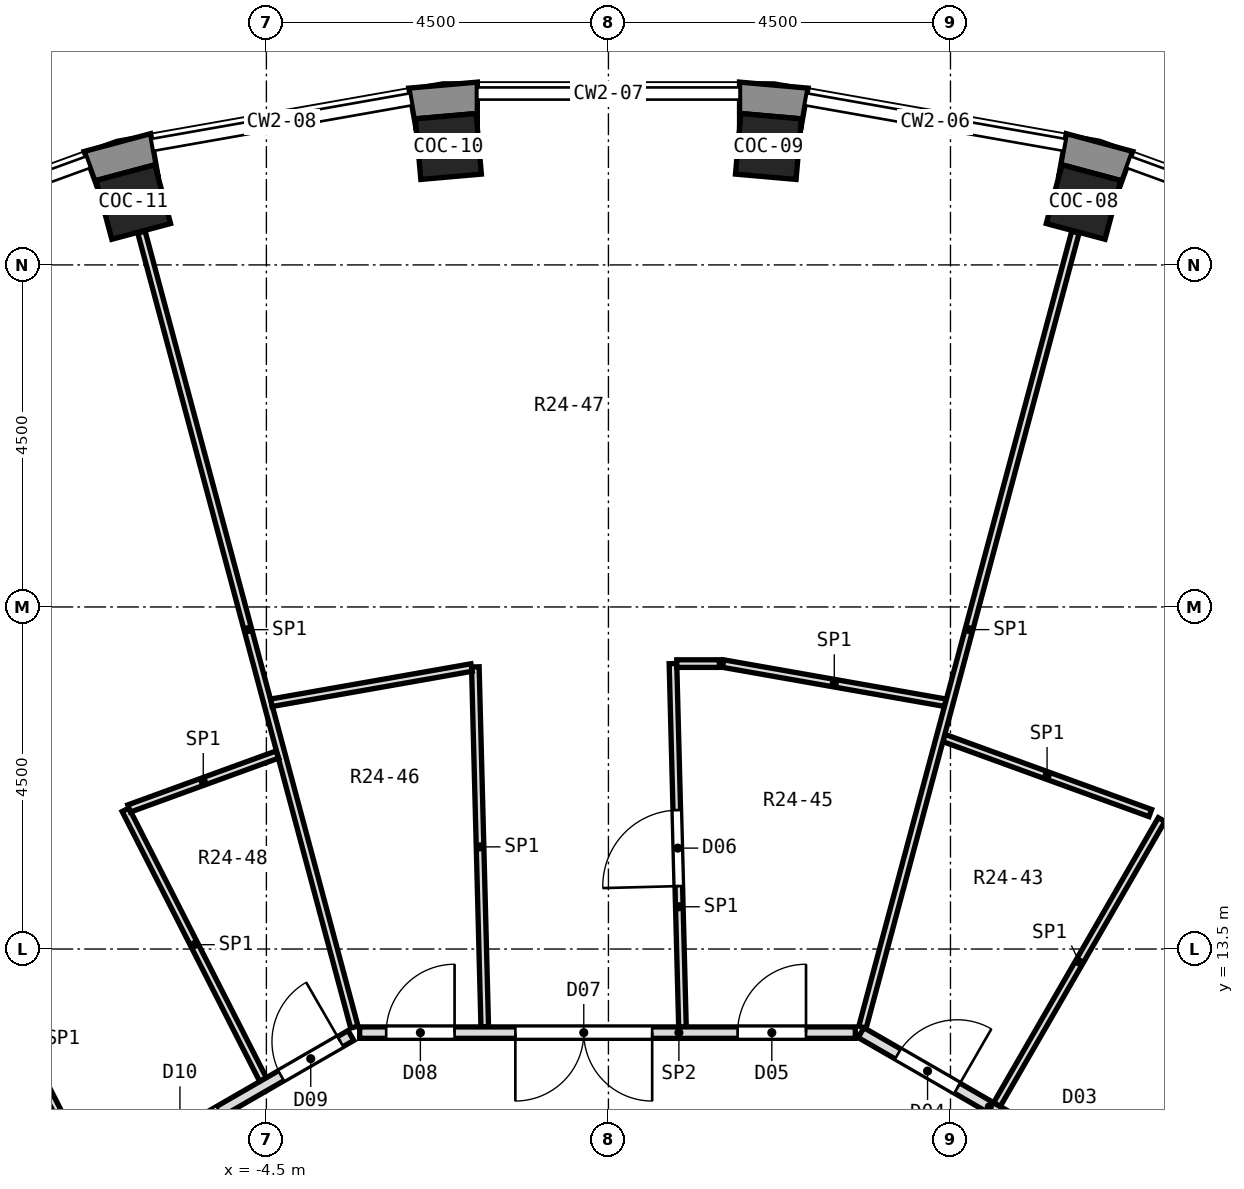
"""IFC4 building model, lengths in metres.
Left out: names, types, materials, properties, quantities, classifications, styles, units other than length and angle.
Written with IfcOpenShell. Run it as: python <this file> out.ifc"""

import sys

from ifc_helpers import new_model, si_unit, direction, frame, frame_2d, origin, origin_2d, place, context, subcontext, project, spatial, polyline, rectangle, outline, extrude, element, fill, save


model = new_model("IFC4")
c1 = context("Model", 3, precision=1e-05, world=origin(), true_north=direction((0.0, 1.0)))
c2 = subcontext(c1, "Body", "Model", "MODEL_VIEW")
j1 = project(units=[si_unit("LENGTHUNIT", "METRE"), si_unit("PLANEANGLEUNIT", "RADIAN")], contexts=[c1])
p1 = place(None, origin())
s1 = spatial("IfcSite", under=j1, at=p1, CompositionType="ELEMENT")
p2 = place(p1, origin())
s2 = spatial("IfcBuilding", under=s1, at=p2, CompositionType="ELEMENT")
p3 = place(p2, frame((0.0, 0.0, 155.8)))
s3 = spatial("IfcBuildingStorey", under=s2, at=p3, CompositionType="ELEMENT", Elevation=155.8)
for number, where, z_axis, x_axis in (
    (1, (6.25, 23.327, -0.55), (0.0, 0.0, 1.0), (0.259, 0.966, 0.0)),
    (2, (2.105, 24.058, -0.55), (0.0, 0.0, 1.0), (0.087, 0.996, 0.0)),
    (3, (-2.105, 24.058, -0.55), (0.0, 0.0, 1.0), (-0.087, 0.996, 0.0)),
    (4, (-6.25, 23.327, -0.55), (0.0, 0.0, 1.0), (-0.259, 0.966, 0.0)),
):
    element("IfcColumn", number, at=place(p3, frame(where, z_axis=z_axis, x_axis=x_axis)), inside=s3, PredefinedType="COLUMN", context=c2, shape_type="SweptSolid", body=[
        extrude(rectangle(XDim=0.8, YDim=0.8, at=origin_2d()), origin(), (0.0, 0.0, 1.0), 5.55),
    ])
p4 = place(p3, origin())
e5 = element("IfcWall", 5, at=p4, inside=s3, PredefinedType="SOLIDWALL", context=c2, shape_type="SweptSolid", body=[
    extrude(outline(polyline([(6.023, 24.227), (5.919, 23.636), (5.968, 23.817), (6.74, 23.61), (6.692, 23.429), (6.897, 23.993), (6.023, 24.227)])), origin(), (0.0, 0.0, 1.0), 4.55),
])
p5 = place(p3, origin())
e6 = element("IfcWall", 6, at=p5, inside=s3, PredefinedType="SOLIDWALL", context=c2, shape_type="SweptSolid", body=[
    extrude(outline(polyline([(2.626, 24.826), (1.725, 24.905), (1.725, 24.305), (1.741, 24.491), (2.538, 24.422), (2.522, 24.235), (2.626, 24.826)])), origin(), (0.0, 0.0, 1.0), 4.55),
])
p6 = place(p3, origin())
e7 = element("IfcWall", 7, at=p6, inside=s3, PredefinedType="SOLIDWALL", context=c2, shape_type="SweptSolid", body=[
    extrude(outline(polyline([(-1.725, 24.905), (-2.626, 24.826), (-2.522, 24.235), (-2.538, 24.422), (-1.741, 24.491), (-1.725, 24.305), (-1.725, 24.905)])), origin(), (0.0, 0.0, 1.0), 4.55),
])
p7 = place(p3, origin())
e8 = element("IfcWall", 8, at=p7, inside=s3, PredefinedType="SOLIDWALL", context=c2, shape_type="SweptSolid", body=[
    extrude(outline(polyline([(-6.023, 24.227), (-6.897, 23.993), (-6.692, 23.429), (-6.74, 23.61), (-5.968, 23.817), (-5.919, 23.636), (-6.023, 24.227)])), origin(), (0.0, 0.0, 1.0), 4.55),
])
p8 = place(p3, frame((-1.751, 17.212, 0.0), z_axis=(0.0, 0.0, 1.0), x_axis=(0.026173897622, -0.999657404856, 0.0)))
e9 = element("IfcWall", 9, at=p8, inside=s3, PredefinedType="PARTITIONING", context=c2, shape_type="SweptSolid", body=[
    extrude(rectangle(XDim=4.739, YDim=0.1, at=frame_2d((2.369, 0.0))), origin(), (0.0, 0.0, 1.0), 4.55),
])
p9 = place(p3, frame((0.849, 17.255, 0.0), z_axis=(0.0, 0.0, 1.0), x_axis=(0.0261428648, -0.999658216902, 0.0)))
e10 = element("IfcWall", 10, at=p9, inside=s3, PredefinedType="PARTITIONING", context=c2, shape_type="SweptSolid", body=[
    extrude(rectangle(XDim=4.781, YDim=0.1, at=frame_2d((2.391, 0.0))), origin(), (0.0, 0.0, 1.0), 4.55),
])
p10 = place(p9, frame((1.928, 0.0, 0.0)))
e11 = element("IfcOpeningElement", 11, at=p10, cuts=e10, PredefinedType="OPENING", context=c2, shape_type="SweptSolid", body=[
    extrude(rectangle(XDim=1.0, YDim=2.1, at=frame_2d((0.5, 1.05))), frame((0.0, 0.062, 0.0), z_axis=(0.0, -1.0, 0.0), x_axis=(1.0, 0.0, 0.0)), (0.0, 0.0, 1.0), 0.124),
])
p11 = place(p3, frame((-6.144, 22.931, 0.0), z_axis=(0.0, 0.0, 1.0), x_axis=(0.258715046682, -0.965953686582, 0.0)))
e12 = element("IfcWall", 12, at=p11, inside=s3, PredefinedType="PARTITIONING", context=c2, shape_type="SweptSolid", body=[
    extrude(rectangle(XDim=10.828, YDim=0.1, at=frame_2d((5.414, 0.0))), origin(), (0.0, 0.0, 1.0), 4.55),
])
p12 = place(p3, frame((-8.665, 14.142, 0.0), z_axis=(0.0, 0.0, 1.0), x_axis=(0.453972049437, -0.891015924847, 0.0)))
e13 = element("IfcWall", 13, at=p12, inside=s3, PredefinedType="PARTITIONING", context=c2, shape_type="SweptSolid", body=[
    extrude(rectangle(XDim=4.11, YDim=0.1, at=frame_2d((2.055, 0.0))), origin(), (0.0, 0.0, 1.0), 4.55),
])
p13 = place(p3, frame((-6.353, 15.332, 0.0), z_axis=(0.0, 0.0, 1.0), x_axis=(0.454013892244, -0.890994604725, 0.0)))
e14 = element("IfcWall", 14, at=p13, inside=s3, PredefinedType="PARTITIONING", context=c2, shape_type="SweptSolid", body=[
    extrude(rectangle(XDim=3.985, YDim=0.1, at=frame_2d((1.992, 0.0))), origin(), (0.0, 0.0, 1.0), 4.55),
])
p14 = place(p3, frame((3.323, 12.4, 0.0), z_axis=(0.0, 0.0, 1.0), x_axis=(0.865961614908, -0.500110469302, 0.0)))
e15 = element("IfcWall", 15, at=p14, inside=s3, PredefinedType="PARTITIONING", context=c2, shape_type="SweptSolid", body=[
    extrude(rectangle(XDim=6.645, YDim=0.15, at=frame_2d((3.322, 0.0))), origin(), (0.0, 0.0, 1.0), 4.55),
])
p15 = place(p14, frame((2.422, 0.0, 0.0)))
e16 = element("IfcOpeningElement", 16, at=p15, cuts=e15, PredefinedType="OPENING", context=c2, shape_type="SweptSolid", body=[
    extrude(rectangle(XDim=1.8, YDim=2.1, at=frame_2d((0.9, 1.05))), frame((0.0, 0.087, 0.0), z_axis=(0.0, -1.0, 0.0), x_axis=(1.0, 0.0, 0.0)), (0.0, 0.0, 1.0), 0.174),
])
p16 = place(p14, frame((0.561, 0.0, 0.0)))
e17 = element("IfcOpeningElement", 17, at=p16, cuts=e15, PredefinedType="OPENING", context=c2, shape_type="SweptSolid", body=[
    extrude(rectangle(XDim=0.9, YDim=2.1, at=frame_2d((0.45, 1.05))), frame((0.0, 0.087, 0.0), z_axis=(0.0, -1.0, 0.0), x_axis=(1.0, 0.0, 0.0)), (0.0, 0.0, 1.0), 0.174),
])
p17 = place(p3, frame((4.413, 16.277, 0.0), z_axis=(0.0, 0.0, 1.0), x_axis=(0.939768755, -0.341810893809, 0.0)))
e18 = element("IfcWall", 18, at=p17, inside=s3, PredefinedType="PARTITIONING", context=c2, shape_type="SweptSolid", body=[
    extrude(rectangle(XDim=2.89, YDim=0.1, at=frame_2d((1.445, 0.0))), origin(), (0.0, 0.0, 1.0), 4.55),
])
p18 = place(p3, frame((1.51, 17.255, 0.0), z_axis=(0.0, 0.0, 1.0), x_axis=(0.984831536916, -0.173513238385, 0.0)))
e19 = element("IfcWall", 19, at=p18, inside=s3, PredefinedType="PARTITIONING", context=c2, shape_type="SweptSolid", body=[
    extrude(rectangle(XDim=2.969, YDim=0.1, at=frame_2d((1.484, 0.0))), origin(), (0.0, 0.0, 1.0), 4.55),
])
p19 = place(p3, frame((-3.273, 12.4, 0.0), z_axis=(0.0, 0.0, 1.0), x_axis=(1.0, 0.0, 0.0)))
e20 = element("IfcWall", 20, at=p19, inside=s3, PredefinedType="PARTITIONING", context=c2, shape_type="SweptSolid", body=[
    extrude(rectangle(XDim=6.521, YDim=0.15, at=frame_2d((3.26, 0.0))), origin(), (0.0, 0.0, 1.0), 4.55),
])
p20 = place(p19, frame((4.972, 0.0, 0.0)))
e21 = element("IfcOpeningElement", 21, at=p20, cuts=e20, PredefinedType="OPENING", context=c2, shape_type="SweptSolid", body=[
    extrude(rectangle(XDim=0.9, YDim=2.1, at=frame_2d((0.45, 1.05))), frame((0.0, 0.087, 0.0), z_axis=(0.0, -1.0, 0.0), x_axis=(1.0, 0.0, 0.0)), (0.0, 0.0, 1.0), 0.174),
])
p21 = place(p19, frame((2.049, 0.0, 0.0)))
e22 = element("IfcOpeningElement", 22, at=p21, cuts=e20, PredefinedType="OPENING", context=c2, shape_type="SweptSolid", body=[
    extrude(rectangle(XDim=1.8, YDim=2.1, at=frame_2d((0.9, 1.05))), frame((0.0, 0.087, 0.0), z_axis=(0.0, -1.0, 0.0), x_axis=(1.0, 0.0, 0.0)), (0.0, 0.0, 1.0), 0.174),
])
p22 = place(p19, frame((0.349, 0.0, 0.0)))
e23 = element("IfcOpeningElement", 23, at=p22, cuts=e20, PredefinedType="OPENING", context=c2, shape_type="SweptSolid", body=[
    extrude(rectangle(XDim=0.9, YDim=2.1, at=frame_2d((0.45, 1.05))), frame((0.0, 0.087, 0.0), z_axis=(0.0, -1.0, 0.0), x_axis=(1.0, 0.0, 0.0)), (0.0, 0.0, 1.0), 0.174),
])
p23 = place(p3, frame((0.899, 17.255, 0.0), z_axis=(0.0, 0.0, 1.0), x_axis=(1.0, 0.0, 0.0)))
e24 = element("IfcWall", 24, at=p23, inside=s3, PredefinedType="PARTITIONING", context=c2, shape_type="SweptSolid", body=[
    extrude(rectangle(XDim=0.561, YDim=0.1, at=frame_2d((0.281, 0.0))), origin(), (0.0, 0.0, 1.0), 4.55),
])
p24 = place(p3, frame((-4.434, 16.74, 0.0), z_axis=(0.0, 0.0, 1.0), x_axis=(0.984855167118, 0.173379063906, 0.0)))
e25 = element("IfcWall", 25, at=p24, inside=s3, PredefinedType="PARTITIONING", context=c2, shape_type="SweptSolid", body=[
    extrude(rectangle(XDim=2.674, YDim=0.1, at=frame_2d((1.337, 0.0))), origin(), (0.0, 0.0, 1.0), 4.55),
])
p25 = place(p3, frame((-6.306, 15.349, 0.0), z_axis=(0.0, 0.0, 1.0), x_axis=(0.939748778635, 0.341865811474, 0.0)))
e26 = element("IfcWall", 26, at=p25, inside=s3, PredefinedType="PARTITIONING", context=c2, shape_type="SweptSolid", body=[
    extrude(rectangle(XDim=2.076, YDim=0.1, at=frame_2d((1.038, 0.0))), origin(), (0.0, 0.0, 1.0), 4.55),
])
p26 = place(p3, frame((-9.012, 9.115, 0.0), z_axis=(0.0, 0.0, 1.0), x_axis=(0.865967095912, 0.5001009786, 0.0)))
e27 = element("IfcWall", 27, at=p26, inside=s3, PredefinedType="PARTITIONING", context=c2, shape_type="SweptSolid", body=[
    extrude(rectangle(XDim=6.495, YDim=0.15, at=frame_2d((3.248, 0.0))), origin(), (0.0, 0.0, 1.0), 4.55),
])
p27 = place(p26, frame((5.434, 0.0, 0.0)))
e28 = element("IfcOpeningElement", 28, at=p27, cuts=e27, PredefinedType="OPENING", context=c2, shape_type="SweptSolid", body=[
    extrude(rectangle(XDim=0.9, YDim=2.1, at=frame_2d((0.45, 1.05))), frame((0.0, 0.087, 0.0), z_axis=(0.0, -1.0, 0.0), x_axis=(1.0, 0.0, 0.0)), (0.0, 0.0, 1.0), 0.174),
])
p28 = place(p26, frame((3.297, 0.0, 0.0)))
e29 = element("IfcOpeningElement", 29, at=p28, cuts=e27, PredefinedType="OPENING", context=c2, shape_type="SweptSolid", body=[
    extrude(rectangle(XDim=1.2, YDim=2.1, at=frame_2d((0.6, 1.05))), frame((0.0, 0.087, 0.0), z_axis=(0.0, -1.0, 0.0), x_axis=(1.0, 0.0, 0.0)), (0.0, 0.0, 1.0), 0.174),
])
p29 = place(p3, frame((5.112, 11.454, 0.0), z_axis=(0.0, 0.0, 1.0), x_axis=(0.500178009373, 0.865922605629, 0.0)))
e30 = element("IfcWall", 30, at=p29, inside=s3, PredefinedType="PARTITIONING", context=c2, shape_type="SweptSolid", body=[
    extrude(rectangle(XDim=4.33, YDim=0.1, at=frame_2d((2.165, 0.0))), origin(), (0.0, 0.0, 1.0), 4.55),
])
p30 = place(p3, frame((3.342, 12.472, 0.0), z_axis=(0.0, 0.0, 1.0), x_axis=(0.258741720617, 0.965946542005, 0.0)))
e31 = element("IfcWall", 31, at=p30, inside=s3, PredefinedType="PARTITIONING", context=c2, shape_type="SweptSolid", body=[
    extrude(rectangle(XDim=10.827, YDim=0.1, at=frame_2d((5.414, 0.0))), origin(), (0.0, 0.0, 1.0), 4.55),
])
p31 = place(p16, origin())
e32 = element("IfcDoor", 32, at=p31, inside=s3, OperationType="SINGLE_SWING_RIGHT", PredefinedType="DOOR", context=c2, shape_type="SweptSolid", body=[
    extrude(rectangle(XDim=0.9, YDim=2.1, at=frame_2d((0.45, 1.05))), frame((0.0, 0.025, 0.0), z_axis=(0.0, -1.0, 0.0), x_axis=(1.0, 0.0, 0.0)), (0.0, 0.0, 1.0), 0.05),
])
fill(e17, e32)
p32 = place(p20, origin())
e33 = element("IfcDoor", 33, at=p32, inside=s3, OperationType="SINGLE_SWING_RIGHT", PredefinedType="DOOR", context=c2, shape_type="SweptSolid", body=[
    extrude(rectangle(XDim=0.9, YDim=2.1, at=frame_2d((0.45, 1.05))), frame((0.0, 0.025, 0.0), z_axis=(0.0, -1.0, 0.0), x_axis=(1.0, 0.0, 0.0)), (0.0, 0.0, 1.0), 0.05),
])
fill(e21, e33)
p33 = place(p10, frame((1.0, 0.0, 0.0), z_axis=(0.0, 0.0, 1.0), x_axis=(-1.0, 0.0, 0.0)))
e34 = element("IfcDoor", 34, at=p33, inside=s3, OperationType="SINGLE_SWING_LEFT", PredefinedType="DOOR", context=c2, shape_type="SweptSolid", body=[
    extrude(rectangle(XDim=1.0, YDim=2.1, at=frame_2d((0.5, 1.05))), frame((0.0, 0.025, 0.0), z_axis=(0.0, -1.0, 0.0), x_axis=(1.0, 0.0, 0.0)), (0.0, 0.0, 1.0), 0.05),
])
fill(e11, e34)
p34 = place(p21, frame((1.8, 0.0, 0.0), z_axis=(0.0, 0.0, 1.0), x_axis=(-1.0, 0.0, 0.0)))
e35 = element("IfcDoor", 35, at=p34, inside=s3, OperationType="DOUBLE_DOOR_SINGLE_SWING", PredefinedType="DOOR", context=c2, shape_type="SweptSolid", body=[
    extrude(rectangle(XDim=1.8, YDim=2.1, at=frame_2d((0.9, 1.05))), frame((0.0, 0.025, 0.0), z_axis=(0.0, -1.0, 0.0), x_axis=(1.0, 0.0, 0.0)), (0.0, 0.0, 1.0), 0.05),
])
fill(e22, e35)
p35 = place(p22, origin())
e36 = element("IfcDoor", 36, at=p35, inside=s3, OperationType="SINGLE_SWING_RIGHT", PredefinedType="DOOR", context=c2, shape_type="SweptSolid", body=[
    extrude(rectangle(XDim=0.9, YDim=2.1, at=frame_2d((0.45, 1.05))), frame((0.0, 0.025, 0.0), z_axis=(0.0, -1.0, 0.0), x_axis=(1.0, 0.0, 0.0)), (0.0, 0.0, 1.0), 0.05),
])
fill(e23, e36)
p36 = place(p27, origin())
e37 = element("IfcDoor", 37, at=p36, inside=s3, OperationType="SINGLE_SWING_RIGHT", PredefinedType="DOOR", context=c2, shape_type="SweptSolid", body=[
    extrude(rectangle(XDim=0.9, YDim=2.1, at=frame_2d((0.45, 1.05))), frame((0.0, 0.025, 0.0), z_axis=(0.0, -1.0, 0.0), x_axis=(1.0, 0.0, 0.0)), (0.0, 0.0, 1.0), 0.05),
])
fill(e28, e37)
save(model, sys.argv[1])
